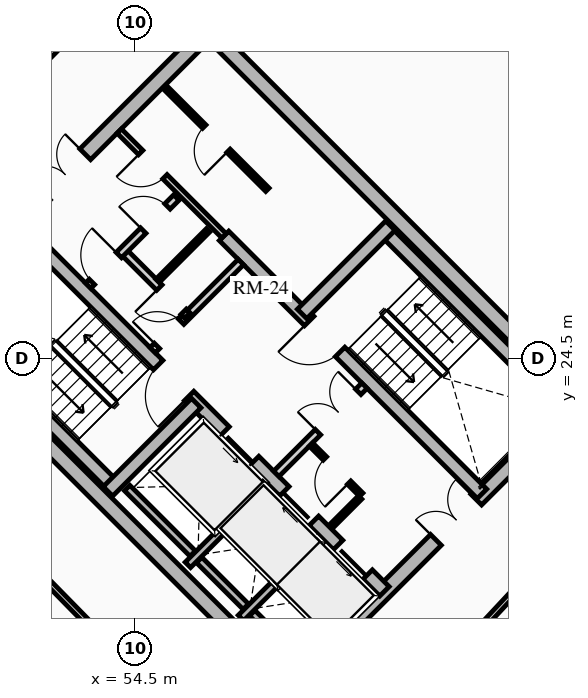
"""IFC4 building model, lengths in metres.
Left out: names, types, materials, properties, quantities, classifications, styles, units other than length and angle.
Written with IfcOpenShell. Run it as: python <this file> out.ifc"""

import sys

from ifc_helpers import new_model, si_unit, direction, frame, frame_2d, origin, place, context, subcontext, project, spatial, rectangle, extrude, source, transform, mapped, element, fill, save


model = new_model("IFC4")
c1 = context("Model", 3, precision=1e-05, world=origin(), true_north=direction((0.0, 1.0)))
c2 = subcontext(c1, "Body", "Model", "MODEL_VIEW")
j1 = project(units=[si_unit("LENGTHUNIT", "METRE"), si_unit("PLANEANGLEUNIT", "RADIAN")], contexts=[c1])
p1 = place(None, origin())
s1 = spatial("IfcSite", under=j1, at=p1, CompositionType="ELEMENT")
p2 = place(p1, origin())
s2 = spatial("IfcBuilding", under=s1, at=p2, CompositionType="ELEMENT")
p3 = place(p2, frame((0.0, 0.0, 211.21)))
s3 = spatial("IfcBuildingStorey", under=s2, at=p3, CompositionType="ELEMENT", Elevation=211.21)
for number, where, z_axis, x_axis in (
    (1, (58.702, 15.732, 0.0), (0.0, 0.0, 1.0), (-0.707, 0.707, 0.0)),
    (2, (66.268, 23.298, 0.0), (0.0, 0.0, 1.0), (-0.707, 0.707, 0.0)),
):
    element("IfcWall", number, at=place(p3, frame(where, z_axis=z_axis, x_axis=x_axis)), inside=s3, PredefinedType="SHEAR", context=c2, shape_type="SweptSolid", body=[
        extrude(rectangle(XDim=14.1, YDim=0.4, at=frame_2d((7.05, 0.0))), origin(), (0.0, 0.0, 1.0), 2.91),
    ])
p4 = place(p3, frame((58.561, 15.873, 0.0), z_axis=(0.0, 0.0, 1.0), x_axis=(0.707106781187, 0.707106781187, 0.0)))
e3 = element("IfcWall", 3, at=p4, inside=s3, PredefinedType="SHEAR", context=c2, shape_type="SweptSolid", body=[
    extrude(rectangle(XDim=10.7, YDim=0.4, at=frame_2d((5.35, 0.0))), origin(), (0.0, 0.0, 1.0), 2.91),
])
m1 = source(origin(), c2, "Body", "SweptSolid", [
    extrude(rectangle(XDim=1.5, YDim=2.02, at=frame_2d((0.75, 1.01))), frame((0.0, 0.21, 0.0), z_axis=(0.0, -1.0, 0.0), x_axis=(1.0, 0.0, 0.0)), (0.0, 0.0, 1.0), 0.42),
])
p5 = place(p4, frame((5.45, 0.0, 0.0)))
e4 = element("IfcOpeningElement", 4, at=p5, cuts=e3, PredefinedType="OPENING", context=c2, shape_type="MappedRepresentation", body=[
    mapped(m1, transform((0.0, 0.0, 0.0), x_axis=(1.0, 0.0, 0.0), y_axis=(0.0, 1.0, 0.0), z_axis=(0.0, 0.0, 1.0), scale=1.0)),
])
p6 = place(p3, frame((48.873, 25.561, 0.0), z_axis=(0.0, 0.0, 1.0), x_axis=(0.707106781187, 0.707106781187, 0.0)))
e5 = element("IfcWall", 5, at=p6, inside=s3, PredefinedType="SHEAR", context=c2, shape_type="SweptSolid", body=[
    extrude(rectangle(XDim=10.7, YDim=0.4, at=frame_2d((5.35, 0.0))), origin(), (0.0, 0.0, 1.0), 2.91),
])
p7 = place(p6, frame((4.6, 0.0, 0.0)))
e6 = element("IfcOpeningElement", 6, at=p7, cuts=e5, PredefinedType="OPENING", context=c2, shape_type="MappedRepresentation", body=[
    mapped(m1, transform((0.0, 0.0, 0.0), x_axis=(1.0, 0.0, 0.0), y_axis=(0.0, 1.0, 0.0), z_axis=(0.0, 0.0, 1.0), scale=1.0)),
])
p8 = place(p3, frame((61.06, 18.373, 0.0), z_axis=(0.0, 0.0, 1.0), x_axis=(-0.707106781187, 0.707106781187, 0.0)))
e7 = element("IfcWall", 7, at=p8, inside=s3, PredefinedType="SHEAR", context=c2, shape_type="SweptSolid", body=[
    extrude(rectangle(XDim=13.7, YDim=0.35, at=frame_2d((6.85, 0.0))), origin(), (0.0, 0.0, 1.0), 2.91),
])
m2 = source(origin(), c2, "Body", "SweptSolid", [
    extrude(rectangle(XDim=1.1, YDim=2.015, at=frame_2d((0.55, 1.007))), frame((0.0, 0.185, 0.0), z_axis=(0.0, -1.0, 0.0), x_axis=(1.0, 0.0, 0.0)), (0.0, 0.0, 1.0), 0.37),
])
p9 = place(p8, frame((4.85, 0.0, 0.0)))
e8 = element("IfcOpeningElement", 8, at=p9, cuts=e7, PredefinedType="OPENING", context=c2, shape_type="MappedRepresentation", body=[
    mapped(m2, transform((0.0, 0.0, 0.0), x_axis=(1.0, 0.0, 0.0), y_axis=(0.0, 1.0, 0.0), z_axis=(0.0, 0.0, 1.0), scale=1.0)),
])
p10 = place(p8, frame((0.625, 0.0, 0.0)))
e9 = element("IfcOpeningElement", 9, at=p10, cuts=e7, PredefinedType="OPENING", context=c2, shape_type="MappedRepresentation", body=[
    mapped(m2, transform((0.0, 0.0, 0.0), x_axis=(1.0, 0.0, 0.0), y_axis=(0.0, 1.0, 0.0), z_axis=(0.0, 0.0, 1.0), scale=1.0)),
])
p11 = place(p8, frame((2.625, 0.0, 0.0)))
e10 = element("IfcOpeningElement", 10, at=p11, cuts=e7, PredefinedType="OPENING", context=c2, shape_type="MappedRepresentation", body=[
    mapped(m2, transform((0.0, 0.0, 0.0), x_axis=(1.0, 0.0, 0.0), y_axis=(0.0, 1.0, 0.0), z_axis=(0.0, 0.0, 1.0), scale=1.0)),
])
m3 = source(origin(), c2, "Body", "SweptSolid", [
    extrude(rectangle(XDim=1.15, YDim=2.02, at=frame_2d((0.575, 1.01))), frame((0.0, 0.185, 0.0), z_axis=(0.0, -1.0, 0.0), x_axis=(1.0, 0.0, 0.0)), (0.0, 0.0, 1.0), 0.37),
])
p12 = place(p8, frame((7.27, 0.0, 0.0)))
e11 = element("IfcOpeningElement", 11, at=p12, cuts=e7, PredefinedType="OPENING", context=c2, shape_type="MappedRepresentation", body=[
    mapped(m3, transform((0.0, 0.0, 0.0), x_axis=(1.0, 0.0, 0.0), y_axis=(0.0, 1.0, 0.0), z_axis=(0.0, 0.0, 1.0), scale=1.0)),
])
p13 = place(p3, frame((63.627, 20.94, 0.0), z_axis=(0.0, 0.0, 1.0), x_axis=(-0.707119496762, 0.707094065383, 0.0)))
e12 = element("IfcWall", 12, at=p13, inside=s3, PredefinedType="SHEAR", context=c2, shape_type="SweptSolid", body=[
    extrude(rectangle(XDim=9.6, YDim=0.35, at=frame_2d((4.8, 0.0))), origin(), (0.0, 0.0, 1.0), 2.91),
])
p14 = place(p13, frame((5.28, 0.0, 0.0)))
e13 = element("IfcOpeningElement", 13, at=p14, cuts=e12, PredefinedType="OPENING", context=c2, shape_type="MappedRepresentation", body=[
    mapped(m3, transform((0.0, 0.0, 0.0), x_axis=(1.0, 0.0, 0.0), y_axis=(0.0, 1.0, 0.0), z_axis=(0.0, 0.0, 1.0), scale=1.0)),
])
p15 = place(p3, frame((53.922, 21.141, 0.0), z_axis=(0.0, 0.0, 1.0), x_axis=(-0.707106781187, 0.707106781187, 0.0)))
e14 = element("IfcWall", 14, at=p15, inside=s3, PredefinedType="SHEAR", context=c2, shape_type="SweptSolid", body=[
    extrude(rectangle(XDim=6.695, YDim=0.35, at=frame_2d((3.348, 0.0))), origin(), (0.0, 0.0, 1.0), 2.91),
])
p16 = place(p3, frame((53.784, 21.003, 0.0), z_axis=(0.0, 0.0, 1.0), x_axis=(0.707106781187, 0.707106781187, 0.0)))
e15 = element("IfcWall", 15, at=p16, inside=s3, PredefinedType="SHEAR", context=c2, shape_type="SweptSolid", body=[
    extrude(rectangle(XDim=3.285, YDim=0.35, at=frame_2d((1.643, 0.0))), origin(), (0.0, 0.0, 1.0), 2.91),
])
p17 = place(p3, frame((65.812, 23.125, 0.0), z_axis=(0.0, 0.0, 1.0), x_axis=(-0.707106781187, 0.707106781187, 0.0)))
e16 = element("IfcWall", 16, at=p17, inside=s3, PredefinedType="SHEAR", context=c2, shape_type="SweptSolid", body=[
    extrude(rectangle(XDim=6.695, YDim=0.35, at=frame_2d((3.348, 0.0))), origin(), (0.0, 0.0, 1.0), 2.91),
])
p18 = place(p3, frame((58.893, 25.674, 0.0), z_axis=(0.0, 0.0, 1.0), x_axis=(0.707106781187, 0.707106781187, 0.0)))
e17 = element("IfcWall", 17, at=p18, inside=s3, PredefinedType="SHEAR", context=c2, shape_type="SweptSolid", body=[
    extrude(rectangle(XDim=3.285, YDim=0.35, at=frame_2d((1.643, 0.0))), origin(), (0.0, 0.0, 1.0), 2.91),
])
p19 = place(p3, frame((55.888, 19.069, 0.0), z_axis=(0.0, 0.0, 1.0), x_axis=(0.707106781187, 0.707106781187, 0.0)))
e18 = element("IfcWall", 18, at=p19, inside=s3, PredefinedType="SHEAR", context=c2, shape_type="SweptSolid", body=[
    extrude(rectangle(XDim=2.97, YDim=0.2, at=frame_2d((1.485, 0.0))), origin(), (0.0, 0.0, 1.0), 2.91),
])
p20 = place(p3, frame((56.015, 19.366, 0.0), z_axis=(0.0, 0.0, 1.0), x_axis=(-0.707106781187, 0.707106781187, 0.0)))
e19 = element("IfcWall", 19, at=p20, inside=s3, PredefinedType="SHEAR", context=c2, shape_type="SweptSolid", body=[
    extrude(rectangle(XDim=2.44, YDim=0.2, at=frame_2d((1.22, 0.0))), origin(), (0.0, 0.0, 1.0), 2.91),
])
p21 = place(p3, frame((57.284, 17.673, 0.0), z_axis=(0.0, 0.0, 1.0), x_axis=(0.707147878904, 0.70706568108, 0.0)))
e20 = element("IfcWall", 20, at=p21, inside=s3, PredefinedType="SHEAR", context=c2, shape_type="SweptSolid", body=[
    extrude(rectangle(XDim=2.97, YDim=0.2, at=frame_2d((1.485, 0.0))), origin(), (0.0, 0.0, 1.0), 2.91),
])
p22 = place(p3, frame((57.412, 17.97, 0.0), z_axis=(0.0, 0.0, 1.0), x_axis=(-0.707106781187, 0.707106781187, 0.0)))
e21 = element("IfcWall", 21, at=p22, inside=s3, PredefinedType="SHEAR", context=c2, shape_type="SweptSolid", body=[
    extrude(rectangle(XDim=1.735, YDim=0.2, at=frame_2d((0.867, 0.0))), origin(), (0.0, 0.0, 1.0), 2.91),
])
p23 = place(p3, frame((58.737, 16.644, 0.0), z_axis=(0.0, 0.0, 1.0), x_axis=(-0.707032117043, 0.707181437447, 0.0)))
e22 = element("IfcWall", 22, at=p23, inside=s3, PredefinedType="SHEAR", context=c2, shape_type="SweptSolid", body=[
    extrude(rectangle(XDim=1.635, YDim=0.2, at=frame_2d((0.817, 0.0))), origin(), (0.0, 0.0, 1.0), 2.91),
])
p24 = place(p3, frame((58.214, 21.467, 0.0), z_axis=(0.0, 0.0, 1.0), x_axis=(0.707106781187, 0.707106781187, 0.0)))
e23 = element("IfcWall", 23, at=p24, inside=s3, PredefinedType="PARTITIONING", context=c2, shape_type="SweptSolid", body=[
    extrude(rectangle(XDim=3.28, YDim=0.2, at=frame_2d((1.64, 0.0))), origin(), (0.0, 0.0, 1.0), 2.685),
])
m4 = source(origin(), c2, "Body", "SweptSolid", [
    extrude(rectangle(XDim=1.5, YDim=2.02, at=frame_2d((0.75, 1.01))), frame((0.0, 0.11, 0.0), z_axis=(0.0, -1.0, 0.0), x_axis=(1.0, 0.0, 0.0)), (0.0, 0.0, 1.0), 0.22),
])
p25 = place(p24, frame((1.55, 0.0, 0.0)))
e24 = element("IfcOpeningElement", 24, at=p25, cuts=e23, PredefinedType="OPENING", context=c2, shape_type="MappedRepresentation", body=[
    mapped(m4, transform((0.0, 0.0, 0.0), x_axis=(1.0, 0.0, 0.0), y_axis=(0.0, 1.0, 0.0), z_axis=(0.0, 0.0, 1.0), scale=1.0)),
])
p26 = place(p3, frame((54.961, 24.719, 0.0), z_axis=(0.0, 0.0, 1.0), x_axis=(0.707106781187, 0.707106781187, 0.0)))
e25 = element("IfcWall", 25, at=p26, inside=s3, PredefinedType="PARTITIONING", context=c2, shape_type="SweptSolid", body=[
    extrude(rectangle(XDim=3.28, YDim=0.2, at=frame_2d((1.64, 0.0))), origin(), (0.0, 0.0, 1.0), 2.685),
])
m5 = source(origin(), c2, "Body", "SweptSolid", [
    extrude(rectangle(XDim=0.9, YDim=2.005, at=frame_2d((0.45, 1.002))), frame((0.0, 0.11, 0.0), z_axis=(0.0, -1.0, 0.0), x_axis=(1.0, 0.0, 0.0)), (0.0, 0.0, 1.0), 0.22),
])
p27 = place(p26, frame((0.16, 0.0, 0.0)))
e26 = element("IfcOpeningElement", 26, at=p27, cuts=e25, PredefinedType="OPENING", context=c2, shape_type="MappedRepresentation", body=[
    mapped(m5, transform((0.0, 0.0, 0.0), x_axis=(1.0, 0.0, 0.0), y_axis=(0.0, 1.0, 0.0), z_axis=(0.0, 0.0, 1.0), scale=1.0)),
])
p28 = place(p3, frame((55.874, 25.631, 0.0), z_axis=(0.0, 0.0, 1.0), x_axis=(-0.707157639372, 0.707055919343, 0.0)))
e27 = element("IfcWall", 27, at=p28, inside=s3, PredefinedType="PARTITIONING", context=c2, shape_type="SweptSolid", body=[
    extrude(rectangle(XDim=2.4, YDim=0.2, at=frame_2d((1.2, 0.0))), origin(), (0.0, 0.0, 1.0), 2.685),
])
p29 = place(p28, frame((0.14, 0.0, 0.0)))
e28 = element("IfcOpeningElement", 28, at=p29, cuts=e27, PredefinedType="OPENING", context=c2, shape_type="MappedRepresentation", body=[
    mapped(m5, transform((0.0, 0.0, 0.0), x_axis=(1.0, 0.0, 0.0), y_axis=(0.0, 1.0, 0.0), z_axis=(0.0, 0.0, 1.0), scale=1.0)),
])
p30 = place(p3, frame((53.264, 26.416, 0.0), z_axis=(0.0, 0.0, 1.0), x_axis=(0.707106781187, 0.707106781187, 0.0)))
e29 = element("IfcWall", 29, at=p30, inside=s3, PredefinedType="PARTITIONING", context=c2, shape_type="SweptSolid", body=[
    extrude(rectangle(XDim=3.28, YDim=0.2, at=frame_2d((1.64, 0.0))), origin(), (0.0, 0.0, 1.0), 2.685),
])
m6 = source(origin(), c2, "Body", "SweptSolid", [
    extrude(rectangle(XDim=1.0, YDim=2.015, at=frame_2d((0.5, 1.007))), frame((0.0, 0.11, 0.0), z_axis=(0.0, -1.0, 0.0), x_axis=(1.0, 0.0, 0.0)), (0.0, 0.0, 1.0), 0.22),
])
p31 = place(p30, frame((0.14, 0.0, 0.0)))
e30 = element("IfcOpeningElement", 30, at=p31, cuts=e29, PredefinedType="OPENING", context=c2, shape_type="MappedRepresentation", body=[
    mapped(m6, transform((0.0, 0.0, 0.0), x_axis=(1.0, 0.0, 0.0), y_axis=(0.0, 1.0, 0.0), z_axis=(0.0, 0.0, 1.0), scale=1.0)),
])
p32 = place(p30, frame((2.05, 0.0, 0.0)))
e31 = element("IfcOpeningElement", 31, at=p32, cuts=e29, PredefinedType="OPENING", context=c2, shape_type="MappedRepresentation", body=[
    mapped(m5, transform((0.0, 0.0, 0.0), x_axis=(1.0, 0.0, 0.0), y_axis=(0.0, 1.0, 0.0), z_axis=(0.0, 0.0, 1.0), scale=1.0)),
])
p33 = place(p3, frame((60.448, 20.915, 0.0), z_axis=(0.0, 0.0, 1.0), x_axis=(-0.707106781187, 0.707106781187, 0.0)))
e32 = element("IfcWall", 32, at=p33, inside=s3, PredefinedType="PARTITIONING", context=c2, shape_type="SweptSolid", body=[
    extrude(rectangle(XDim=1.87, YDim=0.125, at=frame_2d((0.935, 0.0))), origin(), (0.0, 0.0, 1.0), 2.685),
])
m7 = source(origin(), c2, "Body", "SweptSolid", [
    extrude(rectangle(XDim=0.9, YDim=2.005, at=frame_2d((0.45, 1.002))), frame((0.0, 0.073, 0.0), z_axis=(0.0, -1.0, 0.0), x_axis=(1.0, 0.0, 0.0)), (0.0, 0.0, 1.0), 0.145),
])
p34 = place(p33, frame((0.45, 0.0, 0.0)))
e33 = element("IfcOpeningElement", 33, at=p34, cuts=e32, PredefinedType="OPENING", context=c2, shape_type="MappedRepresentation", body=[
    mapped(m7, transform((0.0, 0.0, 0.0), x_axis=(1.0, 0.0, 0.0), y_axis=(0.0, 1.0, 0.0), z_axis=(0.0, 0.0, 1.0), scale=1.0)),
])
p35 = place(p3, frame((59.643, 20.066, 0.0), z_axis=(0.0, 0.0, 1.0), x_axis=(0.707106781187, 0.707106781187, 0.0)))
e34 = element("IfcWall", 34, at=p35, inside=s3, PredefinedType="PARTITIONING", context=c2, shape_type="SweptSolid", body=[
    extrude(rectangle(XDim=1.1, YDim=0.125, at=frame_2d((0.55, 0.0))), origin(), (0.0, 0.0, 1.0), 2.685),
])
p36 = place(p3, frame((55.089, 26.543, 0.0), z_axis=(0.0, 0.0, 1.0), x_axis=(0.707106781187, 0.707106781187, 0.0)))
e35 = element("IfcWall", 35, at=p36, inside=s3, PredefinedType="PARTITIONING", context=c2, shape_type="SweptSolid", body=[
    extrude(rectangle(XDim=1.88, YDim=0.125, at=frame_2d((0.94, 0.0))), origin(), (0.0, 0.0, 1.0), 2.685),
])
p37 = place(p3, frame((56.839, 27.728, 0.0), z_axis=(0.0, 0.0, 1.0), x_axis=(-0.707106781187, 0.707106781187, 0.0)))
e36 = element("IfcWall", 36, at=p37, inside=s3, PredefinedType="PARTITIONING", context=c2, shape_type="SweptSolid", body=[
    extrude(rectangle(XDim=3.9, YDim=0.16, at=frame_2d((1.95, 0.0))), origin(), (0.0, 0.0, 1.0), 2.685),
])
m8 = source(origin(), c2, "Body", "SweptSolid", [
    extrude(rectangle(XDim=0.9, YDim=2.005, at=frame_2d((0.45, 1.002))), frame((0.0, 0.09, 0.0), z_axis=(0.0, -1.0, 0.0), x_axis=(1.0, 0.0, 0.0)), (0.0, 0.0, 1.0), 0.18),
])
p38 = place(p37, frame((2.2, 0.0, 0.0)))
e37 = element("IfcOpeningElement", 37, at=p38, cuts=e36, PredefinedType="OPENING", context=c2, shape_type="MappedRepresentation", body=[
    mapped(m8, transform((0.0, 0.0, 0.0), x_axis=(1.0, 0.0, 0.0), y_axis=(0.0, 1.0, 0.0), z_axis=(0.0, 0.0, 1.0), scale=1.0)),
])
p39 = place(p3, frame((57.981, 28.941, 0.0), z_axis=(0.0, 0.0, 1.0), x_axis=(-0.707074823725, 0.707138737204, 0.0)))
e38 = element("IfcWall", 38, at=p39, inside=s3, PredefinedType="PARTITIONING", context=c2, shape_type="SweptSolid", body=[
    extrude(rectangle(XDim=3.82, YDim=0.125, at=frame_2d((1.91, 0.0))), origin(), (0.0, 0.0, 1.0), 2.685),
])
p40 = place(p39, frame((1.45, 0.0, 0.0)))
e39 = element("IfcOpeningElement", 39, at=p40, cuts=e38, PredefinedType="OPENING", context=c2, shape_type="MappedRepresentation", body=[
    mapped(m7, transform((0.0, 0.0, 0.0), x_axis=(1.0, 0.0, 0.0), y_axis=(0.0, 1.0, 0.0), z_axis=(0.0, 0.0, 1.0), scale=1.0)),
])
p41 = place(p3, frame((54.427, 34.683, 0.0), z_axis=(0.0, 0.0, 1.0), x_axis=(-0.704178989986, -0.710022499687, 0.0)))
e40 = element("IfcWall", 40, at=p41, inside=s3, PredefinedType="PARTITIONING", context=c2, shape_type="SweptSolid", body=[
    extrude(rectangle(XDim=3.384, YDim=0.15, at=frame_2d((1.692, 0.0))), origin(), (0.0, 0.0, 1.0), 2.322),
])
m9 = source(origin(), c2, "Body", "SweptSolid", [
    extrude(rectangle(XDim=1.05, YDim=2.015, at=frame_2d((0.525, 1.007))), frame((0.0, 0.085, 0.0), z_axis=(0.0, -1.0, 0.0), x_axis=(1.0, 0.0, 0.0)), (0.0, 0.0, 1.0), 0.17),
])
p42 = place(p41, frame((1.298, 0.0, 0.0)))
e41 = element("IfcOpeningElement", 41, at=p42, cuts=e40, PredefinedType="OPENING", context=c2, shape_type="MappedRepresentation", body=[
    mapped(m9, transform((0.0, 0.0, 0.0), x_axis=(1.0, 0.0, 0.0), y_axis=(0.0, 1.0, 0.0), z_axis=(0.0, 0.0, 1.0), scale=1.0)),
])
p43 = place(p3, frame((51.914, 18.914, 0.0), z_axis=(0.0, 0.0, 1.0), x_axis=(0.699999313799, -0.714143515465, 0.0)))
e42 = element("IfcWall", 42, at=p43, inside=s3, PredefinedType="PARTITIONING", context=c2, shape_type="SweptSolid", body=[
    extrude(rectangle(XDim=6.162, YDim=0.15, at=frame_2d((3.081, 0.0))), origin(), (0.0, 0.0, 1.0), 2.255),
])
p44 = place(p3, frame((62.903, 16.667, 0.0), z_axis=(0.0, 0.0, 1.0), x_axis=(0.682371947497, 0.731005147225, 0.0)))
e43 = element("IfcWall", 43, at=p44, inside=s3, PredefinedType="PARTITIONING", context=c2, shape_type="SweptSolid", body=[
    extrude(rectangle(XDim=6.642, YDim=0.15, at=frame_2d((3.321, 0.0))), origin(), (0.0, 0.0, 1.0), 2.255),
])
p45 = place(p44, frame((2.796, 0.0, 0.0)))
e44 = element("IfcOpeningElement", 44, at=p45, cuts=e43, PredefinedType="OPENING", context=c2, shape_type="MappedRepresentation", body=[
    mapped(m9, transform((0.0, 0.0, 0.0), x_axis=(1.0, 0.0, 0.0), y_axis=(0.0, 1.0, 0.0), z_axis=(0.0, 0.0, 1.0), scale=1.0)),
])
m10 = source(origin(), c2, "Body", "SweptSolid", [
    extrude(rectangle(XDim=1.1, YDim=2.015, at=frame_2d((0.55, 1.007))), frame((0.0, 0.025, 0.0), z_axis=(0.0, -1.0, 0.0), x_axis=(1.0, 0.0, 0.0)), (0.0, 0.0, 1.0), 0.05),
])
p46 = place(p9, origin())
e45 = element("IfcDoor", 45, at=p46, inside=s3, OperationType="SLIDING_TO_LEFT", PredefinedType="DOOR", context=c2, shape_type="MappedRepresentation", body=[
    mapped(m10, transform((0.0, 0.0, 0.0), x_axis=(1.0, 0.0, 0.0), y_axis=(0.0, 1.0, 0.0), z_axis=(0.0, 0.0, 1.0), scale=1.0)),
])
fill(e8, e45)
p47 = place(p10, origin())
e46 = element("IfcDoor", 46, at=p47, inside=s3, OperationType="SLIDING_TO_LEFT", PredefinedType="DOOR", context=c2, shape_type="MappedRepresentation", body=[
    mapped(m10, transform((0.0, 0.0, 0.0), x_axis=(1.0, 0.0, 0.0), y_axis=(0.0, 1.0, 0.0), z_axis=(0.0, 0.0, 1.0), scale=1.0)),
])
fill(e9, e46)
p48 = place(p11, origin())
e47 = element("IfcDoor", 47, at=p48, inside=s3, OperationType="SLIDING_TO_RIGHT", PredefinedType="DOOR", context=c2, shape_type="MappedRepresentation", body=[
    mapped(m10, transform((0.0, 0.0, 0.0), x_axis=(1.0, 0.0, 0.0), y_axis=(0.0, 1.0, 0.0), z_axis=(0.0, 0.0, 1.0), scale=1.0)),
])
fill(e10, e47)
m11 = source(origin(), c2, "Body", "SweptSolid", [
    extrude(rectangle(XDim=1.15, YDim=2.02, at=frame_2d((0.575, 1.01))), frame((0.0, 0.025, 0.0), z_axis=(0.0, -1.0, 0.0), x_axis=(1.0, 0.0, 0.0)), (0.0, 0.0, 1.0), 0.05),
])
p49 = place(p12, origin())
e48 = element("IfcDoor", 48, at=p49, inside=s3, OperationType="SINGLE_SWING_LEFT", PredefinedType="DOOR", context=c2, shape_type="MappedRepresentation", body=[
    mapped(m11, transform((0.0, 0.0, 0.0), x_axis=(1.0, 0.0, 0.0), y_axis=(0.0, 1.0, 0.0), z_axis=(0.0, 0.0, 1.0), scale=1.0)),
])
fill(e11, e48)
p50 = place(p14, origin())
e49 = element("IfcDoor", 49, at=p50, inside=s3, OperationType="SINGLE_SWING_RIGHT", PredefinedType="DOOR", context=c2, shape_type="MappedRepresentation", body=[
    mapped(m11, transform((0.0, 0.0, 0.0), x_axis=(1.0, 0.0, 0.0), y_axis=(0.0, 1.0, 0.0), z_axis=(0.0, 0.0, 1.0), scale=1.0)),
])
fill(e13, e49)
m12 = source(origin(), c2, "Body", "SweptSolid", [
    extrude(rectangle(XDim=1.5, YDim=2.02, at=frame_2d((0.75, 1.01))), frame((0.0, 0.025, 0.0), z_axis=(0.0, -1.0, 0.0), x_axis=(1.0, 0.0, 0.0)), (0.0, 0.0, 1.0), 0.05),
])
p51 = place(p7, origin())
e50 = element("IfcDoor", 50, at=p51, inside=s3, OperationType="DOUBLE_DOOR_SINGLE_SWING", PredefinedType="DOOR", context=c2, shape_type="MappedRepresentation", body=[
    mapped(m12, transform((0.0, 0.0, 0.0), x_axis=(1.0, 0.0, 0.0), y_axis=(0.0, 1.0, 0.0), z_axis=(0.0, 0.0, 1.0), scale=1.0)),
])
fill(e6, e50)
p52 = place(p5, origin())
e51 = element("IfcDoor", 51, at=p52, inside=s3, OperationType="DOUBLE_DOOR_SINGLE_SWING", PredefinedType="DOOR", context=c2, shape_type="MappedRepresentation", body=[
    mapped(m12, transform((0.0, 0.0, 0.0), x_axis=(1.0, 0.0, 0.0), y_axis=(0.0, 1.0, 0.0), z_axis=(0.0, 0.0, 1.0), scale=1.0)),
])
fill(e4, e51)
p53 = place(p25, origin())
e52 = element("IfcDoor", 52, at=p53, inside=s3, OperationType="DOUBLE_DOOR_SINGLE_SWING", PredefinedType="DOOR", context=c2, shape_type="MappedRepresentation", body=[
    mapped(m12, transform((0.0, 0.0, 0.0), x_axis=(1.0, 0.0, 0.0), y_axis=(0.0, 1.0, 0.0), z_axis=(0.0, 0.0, 1.0), scale=1.0)),
])
fill(e24, e52)
m13 = source(origin(), c2, "Body", "SweptSolid", [
    extrude(rectangle(XDim=0.9, YDim=2.005, at=frame_2d((0.45, 1.002))), frame((0.0, 0.025, 0.0), z_axis=(0.0, -1.0, 0.0), x_axis=(1.0, 0.0, 0.0)), (0.0, 0.0, 1.0), 0.05),
])
p54 = place(p27, origin())
e53 = element("IfcDoor", 53, at=p54, inside=s3, OperationType="SINGLE_SWING_LEFT", PredefinedType="DOOR", context=c2, shape_type="MappedRepresentation", body=[
    mapped(m13, transform((0.0, 0.0, 0.0), x_axis=(1.0, 0.0, 0.0), y_axis=(0.0, 1.0, 0.0), z_axis=(0.0, 0.0, 1.0), scale=1.0)),
])
fill(e26, e53)
m14 = source(origin(), c2, "Body", "SweptSolid", [
    extrude(rectangle(XDim=1.0, YDim=2.015, at=frame_2d((0.5, 1.007))), frame((0.0, 0.025, 0.0), z_axis=(0.0, -1.0, 0.0), x_axis=(1.0, 0.0, 0.0)), (0.0, 0.0, 1.0), 0.05),
])
p55 = place(p31, origin())
e54 = element("IfcDoor", 54, at=p55, inside=s3, OperationType="SINGLE_SWING_RIGHT", PredefinedType="DOOR", context=c2, shape_type="MappedRepresentation", body=[
    mapped(m14, transform((0.0, 0.0, 0.0), x_axis=(1.0, 0.0, 0.0), y_axis=(0.0, 1.0, 0.0), z_axis=(0.0, 0.0, 1.0), scale=1.0)),
])
fill(e30, e54)
p56 = place(p34, origin())
e55 = element("IfcDoor", 55, at=p56, inside=s3, OperationType="SINGLE_SWING_LEFT", PredefinedType="DOOR", context=c2, shape_type="MappedRepresentation", body=[
    mapped(m13, transform((0.0, 0.0, 0.0), x_axis=(1.0, 0.0, 0.0), y_axis=(0.0, 1.0, 0.0), z_axis=(0.0, 0.0, 1.0), scale=1.0)),
])
fill(e33, e55)
p57 = place(p29, origin())
e56 = element("IfcDoor", 56, at=p57, inside=s3, OperationType="SINGLE_SWING_RIGHT", PredefinedType="DOOR", context=c2, shape_type="MappedRepresentation", body=[
    mapped(m13, transform((0.0, 0.0, 0.0), x_axis=(1.0, 0.0, 0.0), y_axis=(0.0, 1.0, 0.0), z_axis=(0.0, 0.0, 1.0), scale=1.0)),
])
fill(e28, e56)
p58 = place(p32, origin())
e57 = element("IfcDoor", 57, at=p58, inside=s3, OperationType="SINGLE_SWING_LEFT", PredefinedType="DOOR", context=c2, shape_type="MappedRepresentation", body=[
    mapped(m13, transform((0.0, 0.0, 0.0), x_axis=(1.0, 0.0, 0.0), y_axis=(0.0, 1.0, 0.0), z_axis=(0.0, 0.0, 1.0), scale=1.0)),
])
fill(e31, e57)
p59 = place(p38, origin())
e58 = element("IfcDoor", 58, at=p59, inside=s3, OperationType="SINGLE_SWING_RIGHT", PredefinedType="DOOR", context=c2, shape_type="MappedRepresentation", body=[
    mapped(m13, transform((0.0, 0.0, 0.0), x_axis=(1.0, 0.0, 0.0), y_axis=(0.0, 1.0, 0.0), z_axis=(0.0, 0.0, 1.0), scale=1.0)),
])
fill(e37, e58)
p60 = place(p40, origin())
e59 = element("IfcDoor", 59, at=p60, inside=s3, OperationType="SINGLE_SWING_LEFT", PredefinedType="DOOR", context=c2, shape_type="MappedRepresentation", body=[
    mapped(m13, transform((0.0, 0.0, 0.0), x_axis=(1.0, 0.0, 0.0), y_axis=(0.0, 1.0, 0.0), z_axis=(0.0, 0.0, 1.0), scale=1.0)),
])
fill(e39, e59)
save(model, sys.argv[1])
